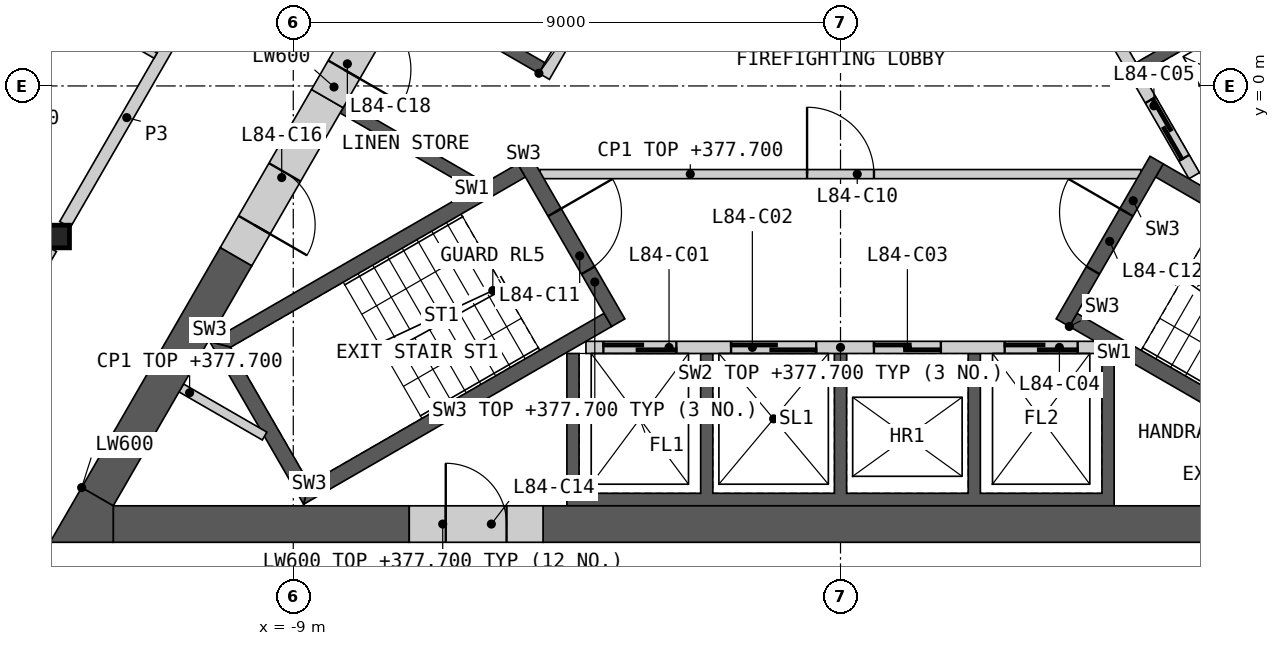
"""IFC4 building model, lengths in metres.
Left out: names, types, materials, properties, quantities, classifications, styles, units other than length and angle.
Written with IfcOpenShell. Run it as: python <this file> out.ifc"""

import sys

from ifc_helpers import new_model, si_unit, direction, frame, frame_2d, origin, origin_2d, place, context, subcontext, project, spatial, polyline, rectangle, i_section, outline, extrude, element, fill, save


model = new_model("IFC4")
c1 = context("Model", 3, precision=1e-05, world=origin(), true_north=direction((0.0, 1.0)))
c2 = subcontext(c1, "Body", "Model", "MODEL_VIEW")
j1 = project(units=[si_unit("LENGTHUNIT", "METRE"), si_unit("PLANEANGLEUNIT", "RADIAN")], contexts=[c1])
p1 = place(None, origin())
s1 = spatial("IfcSite", under=j1, at=p1, CompositionType="ELEMENT")
p2 = place(p1, origin())
s2 = spatial("IfcBuilding", under=s1, at=p2, CompositionType="ELEMENT")
p3 = place(p2, frame((0.0, 0.0, 374.6)))
s3 = spatial("IfcBuildingStorey", under=s2, at=p3, CompositionType="ELEMENT", Elevation=374.6)
p4 = place(p3, frame((-12.868, -2.476, 0.0), z_axis=(0.0, 0.0, 1.0), x_axis=(1.0, 0.0, 0.0)))
e1 = element("IfcColumn", 1, at=p4, inside=s3, PredefinedType="COLUMN", context=c2, shape_type="SweptSolid", body=[
    extrude(i_section(OverallWidth=0.374, OverallDepth=0.372, WebThickness=0.016, FlangeThickness=0.026, at=origin_2d()), origin(), (0.0, 0.0, 1.0), 3.4),
])
p5 = place(p3, origin())
e2 = element("IfcWall", 2, at=p5, inside=s3, PredefinedType="SHEAR", context=c2, shape_type="SweptSolid", body=[
    extrude(outline(polyline([(4.5, -4.4), (4.5, -6.906), (-4.5, -6.906), (-4.5, -4.4), (-4.3, -4.4), (-4.3, -6.7), (-2.3, -6.7), (-2.3, -4.4), (-2.1, -4.4), (-2.1, -6.7), (-0.1, -6.7), (-0.1, -4.4), (0.1, -4.4), (0.1, -6.7), (2.1, -6.7), (2.1, -4.4), (2.3, -4.4), (2.3, -6.7), (4.3, -6.7), (4.3, -4.4), (4.5, -4.4)])), origin(), (0.0, 0.0, 1.0), 3.1),
])
p6 = place(p3, frame((-4.187, -4.3, 0.0), z_axis=(0.0, 0.0, 1.0), x_axis=(1.0, 0.0, 0.0)))
e3 = element("IfcWall", 3, at=p6, inside=s3, PredefinedType="SOLIDWALL", context=c2, shape_type="SweptSolid", body=[
    extrude(rectangle(XDim=8.373, YDim=0.2, at=frame_2d((4.187, 0.0))), origin(), (0.0, 0.0, 1.0), 3.1),
])
p7 = place(p6, frame((0.287, 0.0, 0.0)))
e4 = element("IfcOpeningElement", 4, at=p7, cuts=e3, PredefinedType="OPENING", context=c2, shape_type="SweptSolid", body=[
    extrude(rectangle(XDim=1.2, YDim=2.1, at=frame_2d((0.6, 1.05))), frame((0.0, 0.11, 0.0), z_axis=(0.0, -1.0, 0.0), x_axis=(1.0, 0.0, 0.0)), (0.0, 0.0, 1.0), 0.22),
])
p8 = place(p6, frame((2.387, 0.0, 0.0)))
e5 = element("IfcOpeningElement", 5, at=p8, cuts=e3, PredefinedType="OPENING", context=c2, shape_type="SweptSolid", body=[
    extrude(rectangle(XDim=1.4, YDim=2.1, at=frame_2d((0.7, 1.05))), frame((0.0, 0.11, 0.0), z_axis=(0.0, -1.0, 0.0), x_axis=(1.0, 0.0, 0.0)), (0.0, 0.0, 1.0), 0.22),
])
p9 = place(p6, frame((4.737, 0.0, 0.0)))
e6 = element("IfcOpeningElement", 6, at=p9, cuts=e3, PredefinedType="OPENING", context=c2, shape_type="SweptSolid", body=[
    extrude(rectangle(XDim=1.1, YDim=2.1, at=frame_2d((0.55, 1.05))), frame((0.0, 0.11, 0.0), z_axis=(0.0, -1.0, 0.0), x_axis=(1.0, 0.0, 0.0)), (0.0, 0.0, 1.0), 0.22),
])
p10 = place(p6, frame((6.887, 0.0, 0.0)))
e7 = element("IfcOpeningElement", 7, at=p10, cuts=e3, PredefinedType="OPENING", context=c2, shape_type="SweptSolid", body=[
    extrude(rectangle(XDim=1.2, YDim=2.1, at=frame_2d((0.6, 1.05))), frame((0.0, 0.11, 0.0), z_axis=(0.0, -1.0, 0.0), x_axis=(1.0, 0.0, 0.0)), (0.0, 0.0, 1.0), 0.22),
])
p11 = place(p3, origin())
e8 = element("IfcWall", 8, at=p11, inside=s3, PredefinedType="SHEAR", context=c2, shape_type="SweptSolid", body=[
    extrude(outline(polyline([(1.561, 6.097), (3.731, 7.35), (8.231, -0.444), (6.061, -1.697), (5.96, -1.524), (7.952, -0.374), (6.952, 1.358), (4.96, 0.208), (4.861, 0.381), (6.852, 1.531), (5.852, 3.263), (3.861, 2.113), (3.76, 2.287), (5.752, 3.437), (4.752, 5.169), (2.76, 4.019), (2.66, 4.192), (4.652, 5.342), (3.652, 7.074), (1.66, 5.924), (1.561, 6.097)])), origin(), (0.0, 0.0, 1.0), 3.1),
])
p12 = place(p3, frame((5.817, -1.476, 0.0), z_axis=(0.0, 0.0, 1.0), x_axis=(-0.500002616675, 0.866023893041, 0.0)))
e9 = element("IfcWall", 9, at=p12, inside=s3, PredefinedType="SOLIDWALL", context=c2, shape_type="SweptSolid", body=[
    extrude(rectangle(XDim=8.373, YDim=0.2, at=frame_2d((4.187, 0.0))), origin(), (0.0, 0.0, 1.0), 3.1),
])
p13 = place(p12, frame((0.337, 0.0, 0.0)))
e10 = element("IfcOpeningElement", 10, at=p13, cuts=e9, PredefinedType="OPENING", context=c2, shape_type="SweptSolid", body=[
    extrude(rectangle(XDim=1.1, YDim=2.1, at=frame_2d((0.55, 1.05))), frame((0.0, 0.11, 0.0), z_axis=(0.0, -1.0, 0.0), x_axis=(1.0, 0.0, 0.0)), (0.0, 0.0, 1.0), 0.22),
])
p14 = place(p12, frame((2.537, 0.0, 0.0)))
e11 = element("IfcOpeningElement", 11, at=p14, cuts=e9, PredefinedType="OPENING", context=c2, shape_type="SweptSolid", body=[
    extrude(rectangle(XDim=1.1, YDim=2.1, at=frame_2d((0.55, 1.05))), frame((0.0, 0.11, 0.0), z_axis=(0.0, -1.0, 0.0), x_axis=(1.0, 0.0, 0.0)), (0.0, 0.0, 1.0), 0.22),
])
p15 = place(p12, frame((4.737, 0.0, 0.0)))
e12 = element("IfcOpeningElement", 12, at=p15, cuts=e9, PredefinedType="OPENING", context=c2, shape_type="SweptSolid", body=[
    extrude(rectangle(XDim=1.1, YDim=2.1, at=frame_2d((0.55, 1.05))), frame((0.0, 0.11, 0.0), z_axis=(0.0, -1.0, 0.0), x_axis=(1.0, 0.0, 0.0)), (0.0, 0.0, 1.0), 0.22),
])
p16 = place(p12, frame((7.037, 0.0, 0.0)))
e13 = element("IfcOpeningElement", 13, at=p16, cuts=e9, PredefinedType="OPENING", context=c2, shape_type="SweptSolid", body=[
    extrude(rectangle(XDim=0.9, YDim=2.1, at=frame_2d((0.45, 1.05))), frame((0.0, 0.11, 0.0), z_axis=(0.0, -1.0, 0.0), x_axis=(1.0, 0.0, 0.0)), (0.0, 0.0, 1.0), 0.22),
])
p17 = place(p3, origin())
e14 = element("IfcWall", 14, at=p17, inside=s3, PredefinedType="SHEAR", context=c2, shape_type="SweptSolid", body=[
    extrude(outline(polyline([(-6.061, -1.697), (-8.231, -0.444), (-8.131, -0.271), (-5.96, -1.524), (-6.061, -1.697)])), origin(), (0.0, 0.0, 1.0), 3.1),
])
p18 = place(p3, origin())
e15 = element("IfcWall", 15, at=p18, inside=s3, PredefinedType="SHEAR", context=c2, shape_type="SweptSolid", body=[
    extrude(outline(polyline([(-4.96, 0.208), (-7.131, 1.461), (-3.731, 7.35), (-1.561, 6.097), (-1.66, 5.924), (-3.652, 7.074), (-6.852, 1.531), (-4.861, 0.381), (-4.96, 0.208)])), origin(), (0.0, 0.0, 1.0), 3.1),
])
p19 = place(p3, frame((-1.631, 5.776, 0.0), z_axis=(0.0, 0.0, 1.0), x_axis=(-0.499992876559, -0.866029516466, 0.0)))
e16 = element("IfcWall", 16, at=p19, inside=s3, PredefinedType="SOLIDWALL", context=c2, shape_type="SweptSolid", body=[
    extrude(rectangle(XDim=6.486, YDim=0.2, at=frame_2d((3.243, 0.0))), origin(), (0.0, 0.0, 1.0), 3.1),
])
p20 = place(p19, frame((2.637, 0.0, 0.0)))
e17 = element("IfcOpeningElement", 17, at=p20, cuts=e16, PredefinedType="OPENING", context=c2, shape_type="SweptSolid", body=[
    extrude(rectangle(XDim=0.9, YDim=2.1, at=frame_2d((0.45, 1.05))), frame((0.0, 0.11, 0.0), z_axis=(0.0, -1.0, 0.0), x_axis=(1.0, 0.0, 0.0)), (0.0, 0.0, 1.0), 0.22),
])
p21 = place(p3, frame((-4.941, -1.45, 0.0), z_axis=(0.0, 0.0, 1.0), x_axis=(1.0, 0.0, 0.0)))
e18 = element("IfcWall", 18, at=p21, inside=s3, PredefinedType="PARTITIONING", context=c2, shape_type="SweptSolid", body=[
    extrude(rectangle(XDim=9.882, YDim=0.15, at=frame_2d((4.941, 0.0))), origin(), (0.0, 0.0, 1.0), 3.1),
])
p22 = place(p21, frame((4.391, 0.0, 0.0)))
e19 = element("IfcOpeningElement", 19, at=p22, cuts=e18, PredefinedType="OPENING", context=c2, shape_type="SweptSolid", body=[
    extrude(rectangle(XDim=1.1, YDim=2.1, at=frame_2d((0.55, 1.05))), frame((0.0, 0.085, 0.0), z_axis=(0.0, -1.0, 0.0), x_axis=(1.0, 0.0, 0.0)), (0.0, 0.0, 1.0), 0.17),
])
p23 = place(p3, origin())
e20 = element("IfcWall", 20, at=p23, inside=s3, PredefinedType="SHEAR", context=c2, shape_type="SweptSolid", body=[
    extrude(outline(polyline([(-5.307, -1.281), (-10.374, -4.206), (-10.032, -4.298), (-5.182, -1.498), (-5.307, -1.281)])), origin(), (0.0, 0.0, 1.0), 3.1),
])
p24 = place(p3, origin())
e21 = element("IfcWall", 21, at=p24, inside=s3, PredefinedType="SHEAR", context=c2, shape_type="SweptSolid", body=[
    extrude(outline(polyline([(-10.374, -4.206), (-8.83, -6.881), (-8.738, -6.539), (-10.032, -4.298), (-10.374, -4.206)])), origin(), (0.0, 0.0, 1.0), 3.1),
])
p25 = place(p3, origin())
e22 = element("IfcWall", 22, at=p25, inside=s3, PredefinedType="SHEAR", context=c2, shape_type="SweptSolid", body=[
    extrude(outline(polyline([(-8.738, -6.539), (-8.83, -6.881), (-3.763, -3.956), (-3.888, -3.739), (-8.738, -6.539)])), origin(), (0.0, 0.0, 1.0), 3.1),
])
p26 = place(p3, frame((-5.199, -1.219, 0.0), z_axis=(0.0, 0.0, 1.0), x_axis=(0.499982516597, -0.866035497597, 0.0)))
e23 = element("IfcWall", 23, at=p26, inside=s3, PredefinedType="SHEAR", context=c2, shape_type="SweptSolid", body=[
    extrude(rectangle(XDim=3.088, YDim=0.25, at=frame_2d((1.544, 0.0))), origin(), (0.0, 0.0, 1.0), 3.1),
])
p27 = place(p26, frame((0.994, 0.0, 0.0)))
e24 = element("IfcOpeningElement", 24, at=p27, cuts=e23, PredefinedType="OPENING", context=c2, shape_type="SweptSolid", body=[
    extrude(rectangle(XDim=1.1, YDim=2.1, at=frame_2d((0.55, 1.05))), frame((0.0, 0.135, 0.0), z_axis=(0.0, -1.0, 0.0), x_axis=(1.0, 0.0, 0.0)), (0.0, 0.0, 1.0), 0.27),
])
p28 = place(p3, origin())
e25 = element("IfcWall", 25, at=p28, inside=s3, PredefinedType="SHEAR", context=c2, shape_type="SweptSolid", body=[
    extrude(outline(polyline([(3.763, -3.956), (8.83, -6.881), (8.738, -6.539), (3.888, -3.739), (3.763, -3.956)])), origin(), (0.0, 0.0, 1.0), 3.1),
])
p29 = place(p3, origin())
e26 = element("IfcWall", 26, at=p29, inside=s3, PredefinedType="SHEAR", context=c2, shape_type="SweptSolid", body=[
    extrude(outline(polyline([(10.032, -4.298), (10.374, -4.206), (5.307, -1.281), (5.182, -1.498), (10.032, -4.298)])), origin(), (0.0, 0.0, 1.0), 3.1),
])
p30 = place(p3, frame((3.655, -3.893, 0.0), z_axis=(0.0, 0.0, 1.0), x_axis=(0.499982516597, 0.866035497597, 0.0)))
e27 = element("IfcWall", 27, at=p30, inside=s3, PredefinedType="SHEAR", context=c2, shape_type="SweptSolid", body=[
    extrude(rectangle(XDim=3.088, YDim=0.25, at=frame_2d((1.544, 0.0))), origin(), (0.0, 0.0, 1.0), 3.1),
])
p31 = place(p30, frame((0.994, 0.0, 0.0)))
e28 = element("IfcOpeningElement", 28, at=p31, cuts=e27, PredefinedType="OPENING", context=c2, shape_type="SweptSolid", body=[
    extrude(rectangle(XDim=1.1, YDim=2.1, at=frame_2d((0.55, 1.05))), frame((0.0, 0.135, 0.0), z_axis=(0.0, -1.0, 0.0), x_axis=(1.0, 0.0, 0.0)), (0.0, 0.0, 1.0), 0.27),
])
p32 = place(p3, frame((-10.842, -4.967, 0.0), z_axis=(0.0, 0.0, 1.0), x_axis=(0.866098216386, -0.499873863663, 0.0)))
e29 = element("IfcWall", 29, at=p32, inside=s3, PredefinedType="PARTITIONING", context=c2, shape_type="SweptSolid", body=[
    extrude(rectangle(XDim=1.582, YDim=0.15, at=frame_2d((0.791, 0.0))), origin(), (0.0, 0.0, 1.0), 3.1),
])
p33 = place(p3, frame((-4.892, -7.206, 0.0), z_axis=(0.0, 0.0, 1.0), x_axis=(1.0, 0.0, 0.0)))
e30 = element("IfcWall", 30, at=p33, inside=s3, PredefinedType="SHEAR", context=c2, shape_type="SweptSolid", body=[
    extrude(rectangle(XDim=16.853, YDim=0.6, at=frame_2d((8.426, 0.0))), origin(), (0.0, 0.0, 1.0), 3.1),
])
p34 = place(p3, frame((-11.961, -7.206, 0.0), z_axis=(0.0, 0.0, 1.0), x_axis=(1.0, 0.0, 0.0)))
e31 = element("IfcWall", 31, at=p34, inside=s3, PredefinedType="SHEAR", context=c2, shape_type="SweptSolid", body=[
    extrude(rectangle(XDim=4.868, YDim=0.6, at=frame_2d((2.434, 0.0))), origin(), (0.0, 0.0, 1.0), 3.1),
])
p35 = place(p3, frame((8.686, -0.634, 0.0), z_axis=(0.0, 0.0, 1.0), x_axis=(-0.500004601921, 0.866022746848, 0.0)))
e32 = element("IfcWall", 32, at=p35, inside=s3, PredefinedType="SHEAR", context=c2, shape_type="SweptSolid", body=[
    extrude(rectangle(XDim=16.853, YDim=0.6, at=frame_2d((8.426, 0.0))), origin(), (0.0, 0.0, 1.0), 3.1),
])
p36 = place(p3, frame((-9.941, -2.807, 0.0), z_axis=(0.0, 0.0, 1.0), x_axis=(-0.500020646047, -0.866013483456, 0.0)))
e33 = element("IfcWall", 33, at=p36, inside=s3, PredefinedType="SHEAR", context=c2, shape_type="SweptSolid", body=[
    extrude(rectangle(XDim=4.559, YDim=0.6, at=frame_2d((2.28, 0.0))), origin(), (0.0, 0.0, 1.0), 3.1),
])
p37 = place(p3, origin())
e34 = element("IfcWall", 34, at=p37, inside=s3, PredefinedType="SHEAR", context=c2, shape_type="SweptSolid", body=[
    extrude(outline(polyline([(-12.48, -6.606), (-11.961, -6.906), (-11.961, -7.506), (-13.0, -7.506), (-12.48, -6.606)])), origin(), (0.0, 0.0, 1.0), 3.1),
])
p38 = place(p3, frame((-7.092, -7.206, 0.0), z_axis=(0.0, 0.0, 1.0), x_axis=(1.0, 0.0, 0.0)))
e35 = element("IfcWall", 35, at=p38, inside=s3, PredefinedType="SHEAR", context=c2, shape_type="SweptSolid", body=[
    extrude(rectangle(XDim=2.2, YDim=0.6, at=frame_2d((1.1, 0.0))), origin(), (0.0, 0.0, 1.0), 3.1),
])
p39 = place(p38, frame((0.6, 0.0, 0.0)))
e36 = element("IfcOpeningElement", 36, at=p39, cuts=e35, PredefinedType="OPENING", context=c2, shape_type="SweptSolid", body=[
    extrude(rectangle(XDim=1.0, YDim=2.1, at=frame_2d((0.5, 1.05))), frame((0.0, 0.31, 0.0), z_axis=(0.0, -1.0, 0.0), x_axis=(1.0, 0.0, 0.0)), (0.0, 0.0, 1.0), 0.62),
])
p40 = place(p3, frame((-8.44, -0.208, 0.0), z_axis=(0.0, 0.0, 1.0), x_axis=(-0.499997052475, -0.866027105532, 0.0)))
e37 = element("IfcWall", 37, at=p40, inside=s3, PredefinedType="SHEAR", context=c2, shape_type="SweptSolid", body=[
    extrude(rectangle(XDim=3.001, YDim=0.6, at=frame_2d((1.501, 0.0))), origin(), (0.0, 0.0, 1.0), 3.1),
])
p41 = place(p40, frame((1.4, 0.0, 0.0)))
e38 = element("IfcOpeningElement", 38, at=p41, cuts=e37, PredefinedType="OPENING", context=c2, shape_type="SweptSolid", body=[
    extrude(rectangle(XDim=1.0, YDim=2.1, at=frame_2d((0.5, 1.05))), frame((0.0, 0.31, 0.0), z_axis=(0.0, -1.0, 0.0), x_axis=(1.0, 0.0, 0.0)), (0.0, 0.0, 1.0), 0.62),
])
p42 = place(p3, frame((-7.34, 1.698, 0.0), z_axis=(0.0, 0.0, 1.0), x_axis=(-0.50002983664, -0.866008176907, 0.0)))
e39 = element("IfcWall", 39, at=p42, inside=s3, PredefinedType="SHEAR", context=c2, shape_type="SweptSolid", body=[
    extrude(rectangle(XDim=2.2, YDim=0.6, at=frame_2d((1.1, 0.0))), origin(), (0.0, 0.0, 1.0), 3.1),
])
p43 = place(p42, frame((0.55, 0.0, 0.0)))
e40 = element("IfcOpeningElement", 40, at=p43, cuts=e39, PredefinedType="OPENING", context=c2, shape_type="SweptSolid", body=[
    extrude(rectangle(XDim=1.1, YDim=2.1, at=frame_2d((0.55, 1.05))), frame((0.0, 0.31, 0.0), z_axis=(0.0, -1.0, 0.0), x_axis=(1.0, 0.0, 0.0)), (0.0, 0.0, 1.0), 0.62),
])
p44 = place(p3, frame((-12.754, -2.279, 0.0), z_axis=(0.0, 0.0, 1.0), x_axis=(0.500001682468, 0.866024432409, 0.0)))
e41 = element("IfcWall", 41, at=p44, inside=s3, PredefinedType="PARTITIONING", context=c2, shape_type="SweptSolid", body=[
    extrude(rectangle(XDim=8.124, YDim=0.2, at=frame_2d((4.062, 0.0))), origin(), (0.0, 0.0, 1.0), 3.1),
])
p45 = place(p44, frame((3.762, 0.0, 0.0)))
e42 = element("IfcOpeningElement", 42, at=p45, cuts=e41, PredefinedType="OPENING", context=c2, shape_type="SweptSolid", body=[
    extrude(rectangle(XDim=1.0, YDim=2.1, at=frame_2d((0.5, 1.05))), frame((0.0, 0.11, 0.0), z_axis=(0.0, -1.0, 0.0), x_axis=(1.0, 0.0, 0.0)), (0.0, 0.0, 1.0), 0.22),
])
p46 = place(p3, frame((-15.131, -6.397, 0.0), z_axis=(0.0, 0.0, 1.0), x_axis=(0.499986217557, 0.866033360935, 0.0)))
e43 = element("IfcWall", 43, at=p46, inside=s3, PredefinedType="PARTITIONING", context=c2, shape_type="SweptSolid", body=[
    extrude(rectangle(XDim=4.3, YDim=0.2, at=frame_2d((2.15, 0.0))), origin(), (0.0, 0.0, 1.0), 3.1),
])
p47 = place(p3, frame((-17.414, 4.049, 0.0), z_axis=(0.0, 0.0, 1.0), x_axis=(0.866033839264, -0.499985389037, 0.0)))
e44 = element("IfcWall", 44, at=p47, inside=s3, PredefinedType="PARTITIONING", context=c2, shape_type="SweptSolid", body=[
    extrude(rectangle(XDim=7.1, YDim=0.1, at=frame_2d((3.55, 0.0))), origin(), (0.0, 0.0, 1.0), 2.33),
])
p48 = place(p47, frame((1.158, 0.0, 0.0)))
e45 = element("IfcOpeningElement", 45, at=p48, cuts=e44, PredefinedType="OPENING", context=c2, shape_type="SweptSolid", body=[
    extrude(rectangle(XDim=0.95, YDim=2.1, at=frame_2d((0.475, 1.05))), frame((0.0, 0.06, 0.0), z_axis=(0.0, -1.0, 0.0), x_axis=(1.0, 0.0, 0.0)), (0.0, 0.0, 1.0), 0.12),
])
p49 = place(p7, origin())
e46 = element("IfcDoor", 46, at=p49, inside=s3, OperationType="SLIDING_TO_LEFT", PredefinedType="DOOR", context=c2, shape_type="SweptSolid", body=[
    extrude(rectangle(XDim=1.2, YDim=2.1, at=frame_2d((0.6, 1.05))), frame((0.0, 0.025, 0.0), z_axis=(0.0, -1.0, 0.0), x_axis=(1.0, 0.0, 0.0)), (0.0, 0.0, 1.0), 0.05),
])
fill(e4, e46)
p50 = place(p8, origin())
e47 = element("IfcDoor", 47, at=p50, inside=s3, OperationType="SLIDING_TO_LEFT", PredefinedType="DOOR", context=c2, shape_type="SweptSolid", body=[
    extrude(rectangle(XDim=1.4, YDim=2.1, at=frame_2d((0.7, 1.05))), frame((0.0, 0.025, 0.0), z_axis=(0.0, -1.0, 0.0), x_axis=(1.0, 0.0, 0.0)), (0.0, 0.0, 1.0), 0.05),
])
fill(e5, e47)
p51 = place(p9, origin())
e48 = element("IfcDoor", 48, at=p51, inside=s3, OperationType="SLIDING_TO_LEFT", PredefinedType="DOOR", context=c2, shape_type="SweptSolid", body=[
    extrude(rectangle(XDim=1.1, YDim=2.1, at=frame_2d((0.55, 1.05))), frame((0.0, 0.025, 0.0), z_axis=(0.0, -1.0, 0.0), x_axis=(1.0, 0.0, 0.0)), (0.0, 0.0, 1.0), 0.05),
])
fill(e6, e48)
p52 = place(p10, origin())
e49 = element("IfcDoor", 49, at=p52, inside=s3, OperationType="SLIDING_TO_LEFT", PredefinedType="DOOR", context=c2, shape_type="SweptSolid", body=[
    extrude(rectangle(XDim=1.2, YDim=2.1, at=frame_2d((0.6, 1.05))), frame((0.0, 0.025, 0.0), z_axis=(0.0, -1.0, 0.0), x_axis=(1.0, 0.0, 0.0)), (0.0, 0.0, 1.0), 0.05),
])
fill(e7, e49)
p53 = place(p13, origin())
e50 = element("IfcDoor", 50, at=p53, inside=s3, OperationType="SLIDING_TO_LEFT", PredefinedType="DOOR", context=c2, shape_type="SweptSolid", body=[
    extrude(rectangle(XDim=1.1, YDim=2.1, at=frame_2d((0.55, 1.05))), frame((0.0, 0.025, 0.0), z_axis=(0.0, -1.0, 0.0), x_axis=(1.0, 0.0, 0.0)), (0.0, 0.0, 1.0), 0.05),
])
fill(e10, e50)
p54 = place(p22, origin())
e51 = element("IfcDoor", 51, at=p54, inside=s3, OperationType="SINGLE_SWING_LEFT", PredefinedType="DOOR", context=c2, shape_type="SweptSolid", body=[
    extrude(rectangle(XDim=1.1, YDim=2.1, at=frame_2d((0.55, 1.05))), frame((0.0, 0.025, 0.0), z_axis=(0.0, -1.0, 0.0), x_axis=(1.0, 0.0, 0.0)), (0.0, 0.0, 1.0), 0.05),
])
fill(e19, e51)
p55 = place(p27, origin())
e52 = element("IfcDoor", 52, at=p55, inside=s3, OperationType="SINGLE_SWING_LEFT", PredefinedType="DOOR", context=c2, shape_type="SweptSolid", body=[
    extrude(rectangle(XDim=1.1, YDim=2.1, at=frame_2d((0.55, 1.05))), frame((0.0, 0.025, 0.0), z_axis=(0.0, -1.0, 0.0), x_axis=(1.0, 0.0, 0.0)), (0.0, 0.0, 1.0), 0.05),
])
fill(e24, e52)
p56 = place(p31, origin())
e53 = element("IfcDoor", 53, at=p56, inside=s3, OperationType="SINGLE_SWING_RIGHT", PredefinedType="DOOR", context=c2, shape_type="SweptSolid", body=[
    extrude(rectangle(XDim=1.1, YDim=2.1, at=frame_2d((0.55, 1.05))), frame((0.0, 0.025, 0.0), z_axis=(0.0, -1.0, 0.0), x_axis=(1.0, 0.0, 0.0)), (0.0, 0.0, 1.0), 0.05),
])
fill(e28, e53)
p57 = place(p39, origin())
e54 = element("IfcDoor", 54, at=p57, inside=s3, OperationType="SINGLE_SWING_LEFT", PredefinedType="DOOR", context=c2, shape_type="SweptSolid", body=[
    extrude(rectangle(XDim=1.0, YDim=2.1, at=frame_2d((0.5, 1.05))), frame((0.0, 0.055, 0.0), z_axis=(0.0, -1.0, 0.0), x_axis=(1.0, 0.0, 0.0)), (0.0, 0.0, 1.0), 0.05),
])
fill(e36, e54)
p58 = place(p41, origin())
e55 = element("IfcDoor", 55, at=p58, inside=s3, OperationType="SINGLE_SWING_RIGHT", PredefinedType="DOOR", context=c2, shape_type="SweptSolid", body=[
    extrude(rectangle(XDim=1.0, YDim=2.1, at=frame_2d((0.5, 1.05))), frame((0.0, 0.055, 0.0), z_axis=(0.0, -1.0, 0.0), x_axis=(1.0, 0.0, 0.0)), (0.0, 0.0, 1.0), 0.05),
])
fill(e38, e55)
p59 = place(p43, origin())
e56 = element("IfcDoor", 56, at=p59, inside=s3, OperationType="SINGLE_SWING_RIGHT", PredefinedType="DOOR", context=c2, shape_type="SweptSolid", body=[
    extrude(rectangle(XDim=1.1, YDim=2.1, at=frame_2d((0.55, 1.05))), frame((0.0, 0.055, 0.0), z_axis=(0.0, -1.0, 0.0), x_axis=(1.0, 0.0, 0.0)), (0.0, 0.0, 1.0), 0.05),
])
fill(e40, e56)
save(model, sys.argv[1])
